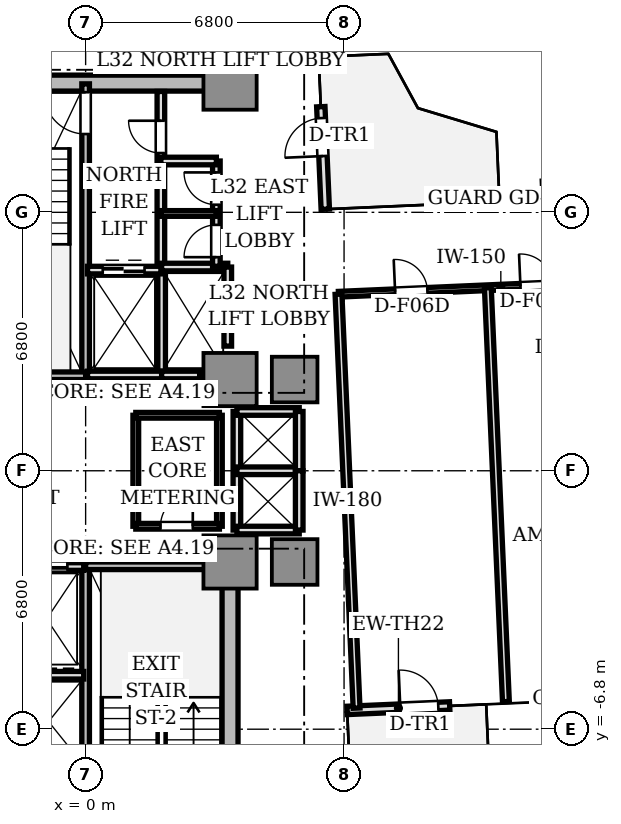
"""IFC4 building model, lengths in metres.
Left out: names, types, materials, properties, quantities, classifications, styles, units other than length and angle.
Written with IfcOpenShell. Run it as: python <this file> out.ifc"""

import sys

from ifc_helpers import new_model, si_unit, direction, frame, frame_2d, origin, origin_2d, place, context, subcontext, project, spatial, rectangle, extrude, source, transform, mapped, element, fill, save


model = new_model("IFC4")
c1 = context("Model", 3, precision=1e-05, world=origin(), true_north=direction((0.0, 1.0)))
c2 = subcontext(c1, "Body", "Model", "MODEL_VIEW")
j1 = project(units=[si_unit("LENGTHUNIT", "METRE"), si_unit("PLANEANGLEUNIT", "RADIAN")], contexts=[c1])
p1 = place(None, origin())
s1 = spatial("IfcSite", under=j1, at=p1, CompositionType="ELEMENT")
p2 = place(p1, origin())
s2 = spatial("IfcBuilding", under=s1, at=p2, CompositionType="ELEMENT")
p3 = place(p2, frame((0.0, 0.0, 118.15)))
s3 = spatial("IfcBuildingStorey", under=s2, at=p3, CompositionType="ELEMENT", Elevation=118.15)
p4 = place(p3, frame((-3.55, 10.2, 0.0), z_axis=(0.0, 0.0, 1.0), x_axis=(1.0, 0.0, 0.0)))
e1 = element("IfcWall", 1, at=p4, inside=s3, PredefinedType="SHEAR", context=c2, shape_type="SweptSolid", body=[
    extrude(rectangle(XDim=7.1, YDim=0.42, at=frame_2d((3.55, 0.0))), origin(), (0.0, 0.0, 1.0), 3.11),
])
p5 = place(p3, frame((3.8, -9.75, 0.0), z_axis=(0.0, 0.0, 1.0), x_axis=(0.0, 1.0, 0.0)))
e2 = element("IfcWall", 2, at=p5, inside=s3, PredefinedType="SHEAR", context=c2, shape_type="SweptSolid", body=[
    extrude(rectangle(XDim=6.9, YDim=0.42, at=frame_2d((3.45, 0.0))), origin(), (0.0, 0.0, 1.0), 3.11),
])
m1 = source(origin(), c2, "Body", "SweptSolid", [
    extrude(rectangle(XDim=1.4, YDim=1.4, at=origin_2d()), origin(), (0.0, 0.0, 1.0), 3.11),
])
for number, where, z_axis, x_axis in (
    (3, (3.8, 2.4, 0.0), (0.0, 0.0, 1.0), (1.0, 0.0, 0.0)),
    (4, (3.8, 10.2, 0.0), (0.0, 0.0, 1.0), (1.0, 0.0, 0.0)),
    (5, (3.8, -2.4, 0.0), (0.0, 0.0, 1.0), (1.0, 0.0, 0.0)),
):
    element("IfcColumn", number, at=place(p3, frame(where, z_axis=z_axis, x_axis=x_axis)), inside=s3, PredefinedType="COLUMN", context=c2, shape_type="MappedRepresentation", body=[
        mapped(m1, transform((0.0, 0.0, 0.0), scale=1.0)),
    ])
m2 = source(origin(), c2, "Body", "SweptSolid", [
    extrude(rectangle(XDim=1.2, YDim=1.2, at=origin_2d()), origin(), (0.0, 0.0, 1.0), 3.11),
])
for number, where, z_axis, x_axis in (
    (6, (5.5, 2.4, 0.0), (0.0, 0.0, 1.0), (1.0, 0.0, 0.0)),
    (7, (5.5, -2.4, 0.0), (0.0, 0.0, 1.0), (1.0, 0.0, 0.0)),
):
    element("IfcColumn", number, at=place(p3, frame(where, z_axis=z_axis, x_axis=x_axis)), inside=s3, PredefinedType="COLUMN", context=c2, shape_type="MappedRepresentation", body=[
        mapped(m2, transform((0.0, 0.0, 0.0), scale=1.0)),
    ])
p6 = place(p3, frame((6.882, -6.306, 0.0), z_axis=(0.0, 0.0, 1.0), x_axis=(0.999045894436, 0.043672655174, 0.0)))
e8 = element("IfcWall", 8, at=p6, inside=s3, PredefinedType="STANDARD", context=c2, shape_type="SweptSolid", body=[
    extrude(rectangle(XDim=2.7, YDim=0.22, at=frame_2d((1.35, 0.0))), origin(), (0.0, 0.0, 1.0), 3.11),
])
p7 = place(p6, frame((1.4, 0.0, 0.0)))
e9 = element("IfcOpeningElement", 9, at=p7, cuts=e8, PredefinedType="OPENING", context=c2, shape_type="SweptSolid", body=[
    extrude(rectangle(XDim=1.0, YDim=2.2, at=frame_2d((0.5, 1.1))), frame((0.0, 0.12, 0.0), z_axis=(0.0, -1.0, 0.0), x_axis=(1.0, 0.0, 0.0)), (0.0, 0.0, 1.0), 0.24),
])
p8 = place(p3, frame((6.306, 6.882, 0.0), z_axis=(0.0, 0.0, 1.0), x_axis=(-0.043672655174, 0.999045894436, 0.0)))
e10 = element("IfcWall", 10, at=p8, inside=s3, PredefinedType="STANDARD", context=c2, shape_type="SweptSolid", body=[
    extrude(rectangle(XDim=2.7, YDim=0.22, at=frame_2d((1.35, 0.0))), origin(), (0.0, 0.0, 1.0), 3.11),
])
p9 = place(p8, frame((1.4, 0.0, 0.0)))
e11 = element("IfcOpeningElement", 11, at=p9, cuts=e10, PredefinedType="OPENING", context=c2, shape_type="SweptSolid", body=[
    extrude(rectangle(XDim=1.0, YDim=2.2, at=frame_2d((0.5, 1.1))), frame((0.0, 0.12, 0.0), z_axis=(0.0, -1.0, 0.0), x_axis=(1.0, 0.0, 0.0)), (0.0, 0.0, 1.0), 0.24),
])
p10 = place(p3, frame((0.0, 2.5, 0.0), z_axis=(0.0, 0.0, 1.0), x_axis=(0.0, 1.0, 0.0)))
e12 = element("IfcWall", 12, at=p10, inside=s3, PredefinedType="SOLIDWALL", context=c2, shape_type="SweptSolid", body=[
    extrude(rectangle(XDim=7.68, YDim=0.2, at=frame_2d((3.84, 0.0))), origin(), (0.0, 0.0, 1.0), 3.11),
])
p11 = place(p10, frame((6.36, 0.0, 0.0)))
e13 = element("IfcOpeningElement", 13, at=p11, cuts=e12, PredefinedType="OPENING", context=c2, shape_type="SweptSolid", body=[
    extrude(rectangle(XDim=1.1, YDim=2.15, at=frame_2d((0.55, 1.075))), frame((0.0, 0.11, 0.0), z_axis=(0.0, -1.0, 0.0), x_axis=(1.0, 0.0, 0.0)), (0.0, 0.0, 1.0), 0.22),
])
p12 = place(p3, frame((-3.72, 2.5, 0.0), z_axis=(0.0, 0.0, 1.0), x_axis=(1.0, 0.0, 0.0)))
e14 = element("IfcWall", 14, at=p12, inside=s3, PredefinedType="SOLIDWALL", context=c2, shape_type="SweptSolid", body=[
    extrude(rectangle(XDim=3.72, YDim=0.2, at=frame_2d((1.86, 0.0))), origin(), (0.0, 0.0, 1.0), 3.11),
])
p13 = place(p3, frame((0.0, -10.18, 0.0), z_axis=(0.0, 0.0, 1.0), x_axis=(0.0, 1.0, 0.0)))
e15 = element("IfcWall", 15, at=p13, inside=s3, PredefinedType="SOLIDWALL", context=c2, shape_type="SweptSolid", body=[
    extrude(rectangle(XDim=7.68, YDim=0.2, at=frame_2d((3.84, 0.0))), origin(), (0.0, 0.0, 1.0), 3.11),
])
p14 = place(p13, frame((0.28, 0.0, 0.0)))
e16 = element("IfcOpeningElement", 16, at=p14, cuts=e15, PredefinedType="OPENING", context=c2, shape_type="SweptSolid", body=[
    extrude(rectangle(XDim=1.1, YDim=2.15, at=frame_2d((0.55, 1.075))), frame((0.0, 0.11, 0.0), z_axis=(0.0, -1.0, 0.0), x_axis=(1.0, 0.0, 0.0)), (0.0, 0.0, 1.0), 0.22),
])
p15 = place(p3, frame((0.0, -2.5, 0.0), z_axis=(0.0, 0.0, 1.0), x_axis=(1.0, 0.0, 0.0)))
e17 = element("IfcWall", 17, at=p15, inside=s3, PredefinedType="SOLIDWALL", context=c2, shape_type="SweptSolid", body=[
    extrude(rectangle(XDim=3.72, YDim=0.2, at=frame_2d((1.86, 0.0))), origin(), (0.0, 0.0, 1.0), 3.11),
])
p16 = place(p3, frame((1.98, 5.32, 0.0), z_axis=(0.0, 0.0, 1.0), x_axis=(0.0, 1.0, 0.0)))
e18 = element("IfcWall", 18, at=p16, inside=s3, PredefinedType="SOLIDWALL", context=c2, shape_type="SweptSolid", body=[
    extrude(rectangle(XDim=4.66, YDim=0.2, at=frame_2d((2.33, 0.0))), origin(), (0.0, 0.0, 1.0), 2.66),
])
p17 = place(p16, frame((3.04, 0.0, 0.0)))
e19 = element("IfcOpeningElement", 19, at=p17, cuts=e18, PredefinedType="OPENING", context=c2, shape_type="SweptSolid", body=[
    extrude(rectangle(XDim=0.85, YDim=2.1, at=frame_2d((0.425, 1.05))), frame((0.0, 0.11, 0.0), z_axis=(0.0, -1.0, 0.0), x_axis=(1.0, 0.0, 0.0)), (0.0, 0.0, 1.0), 0.22),
])
p18 = place(p3, frame((2.0, 2.5, 0.0), z_axis=(0.0, 0.0, 1.0), x_axis=(0.0, 1.0, 0.0)))
e20 = element("IfcWall", 20, at=p18, inside=s3, PredefinedType="SOLIDWALL", context=c2, shape_type="SweptSolid", body=[
    extrude(rectangle(XDim=2.78, YDim=0.2, at=frame_2d((1.39, 0.0))), origin(), (0.0, 0.0, 1.0), 2.66),
])
p19 = place(p3, frame((0.05, 2.52, 0.0), z_axis=(0.0, 0.0, 1.0), x_axis=(1.0, 0.0, 0.0)))
e21 = element("IfcWall", 21, at=p19, inside=s3, PredefinedType="SOLIDWALL", context=c2, shape_type="SweptSolid", body=[
    extrude(rectangle(XDim=1.95, YDim=0.2, at=frame_2d((0.975, 0.0))), origin(), (0.0, 0.0, 1.0), 2.66),
])
p20 = place(p3, frame((0.05, 5.28, 0.0), z_axis=(0.0, 0.0, 1.0), x_axis=(1.0, 0.0, 0.0)))
e22 = element("IfcWall", 22, at=p20, inside=s3, PredefinedType="SOLIDWALL", context=c2, shape_type="SweptSolid", body=[
    extrude(rectangle(XDim=1.93, YDim=0.2, at=frame_2d((0.965, 0.0))), origin(), (0.0, 0.0, 1.0), 2.66),
])
p21 = place(p20, frame((0.4, 0.0, 0.0)))
e23 = element("IfcOpeningElement", 23, at=p21, cuts=e22, PredefinedType="OPENING", context=c2, shape_type="SweptSolid", body=[
    extrude(rectangle(XDim=1.1, YDim=2.2, at=frame_2d((0.55, 1.1))), frame((0.0, 0.11, 0.0), z_axis=(0.0, -1.0, 0.0), x_axis=(1.0, 0.0, 0.0)), (0.0, 0.0, 1.0), 0.22),
])
p22 = place(p3, frame((-2.0, -2.52, 0.0), z_axis=(0.0, 0.0, 1.0), x_axis=(1.0, 0.0, 0.0)))
e24 = element("IfcWall", 24, at=p22, inside=s3, PredefinedType="SOLIDWALL", context=c2, shape_type="SweptSolid", body=[
    extrude(rectangle(XDim=1.95, YDim=0.2, at=frame_2d((0.975, 0.0))), origin(), (0.0, 0.0, 1.0), 2.66),
])
p23 = place(p22, frame((0.42, 0.0, 0.0)))
e25 = element("IfcOpeningElement", 25, at=p23, cuts=e24, PredefinedType="OPENING", context=c2, shape_type="SweptSolid", body=[
    extrude(rectangle(XDim=1.1, YDim=2.2, at=frame_2d((0.55, 1.1))), frame((0.0, 0.11, 0.0), z_axis=(0.0, -1.0, 0.0), x_axis=(1.0, 0.0, 0.0)), (0.0, 0.0, 1.0), 0.22),
])
p24 = place(p3, frame((2.0, 2.52, 0.0), z_axis=(0.0, 0.0, 1.0), x_axis=(1.0, 0.0, 0.0)))
e26 = element("IfcWall", 26, at=p24, inside=s3, PredefinedType="SOLIDWALL", context=c2, shape_type="SweptSolid", body=[
    extrude(rectangle(XDim=1.0, YDim=0.2, at=frame_2d((0.5, 0.0))), origin(), (0.0, 0.0, 1.0), 2.66),
])
p25 = place(p3, frame((2.0, 5.36, 0.0), z_axis=(0.0, 0.0, 1.0), x_axis=(1.0, 0.0, 0.0)))
e27 = element("IfcWall", 27, at=p25, inside=s3, PredefinedType="SOLIDWALL", context=c2, shape_type="SweptSolid", body=[
    extrude(rectangle(XDim=1.74, YDim=0.2, at=frame_2d((0.87, 0.0))), origin(), (0.0, 0.0, 1.0), 2.66),
])
p26 = place(p3, frame((3.74, 3.28, 0.0), z_axis=(0.0, 0.0, 1.0), x_axis=(0.0, 1.0, 0.0)))
e28 = element("IfcWall", 28, at=p26, inside=s3, PredefinedType="SOLIDWALL", context=c2, shape_type="SweptSolid", body=[
    extrude(rectangle(XDim=2.08, YDim=0.2, at=frame_2d((1.04, 0.0))), origin(), (0.0, 0.0, 1.0), 2.66),
])
p27 = place(p26, frame((0.44, 0.0, 0.0)))
e29 = element("IfcOpeningElement", 29, at=p27, cuts=e28, PredefinedType="OPENING", context=c2, shape_type="SweptSolid", body=[
    extrude(rectangle(XDim=1.2, YDim=2.2, at=frame_2d((0.6, 1.1))), frame((0.0, 0.11, 0.0), z_axis=(0.0, -1.0, 0.0), x_axis=(1.0, 0.0, 0.0)), (0.0, 0.0, 1.0), 0.22),
])
p28 = place(p3, frame((-3.74, -5.38, 0.0), z_axis=(0.0, 0.0, 1.0), x_axis=(1.0, 0.0, 0.0)))
e30 = element("IfcWall", 30, at=p28, inside=s3, PredefinedType="SOLIDWALL", context=c2, shape_type="SweptSolid", body=[
    extrude(rectangle(XDim=3.69, YDim=0.2, at=frame_2d((1.845, 0.0))), origin(), (0.0, 0.0, 1.0), 2.66),
])
p29 = place(p3, frame((3.98, -1.56, 0.0), z_axis=(0.0, 0.0, 1.0), x_axis=(0.0, 1.0, 0.0)))
e31 = element("IfcWall", 31, at=p29, inside=s3, PredefinedType="SOLIDWALL", context=c2, shape_type="SweptSolid", body=[
    extrude(rectangle(XDim=3.12, YDim=0.2, at=frame_2d((1.56, 0.0))), origin(), (0.0, 0.0, 1.0), 2.28),
])
for number, where, z_axis, x_axis in (
    (32, (3.98, 1.56, 0.0), (0.0, 0.0, 1.0), (1.0, 0.0, 0.0)),
    (33, (3.98, -1.56, 0.0), (0.0, 0.0, 1.0), (1.0, 0.0, 0.0)),
    (34, (3.98, 0.0, 0.0), (0.0, 0.0, 1.0), (1.0, 0.0, 0.0)),
):
    element("IfcWall", number, at=place(p3, frame(where, z_axis=z_axis, x_axis=x_axis)), inside=s3, PredefinedType="SOLIDWALL", context=c2, shape_type="SweptSolid", body=[
        extrude(rectangle(XDim=1.64, YDim=0.2, at=frame_2d((0.82, 0.0))), origin(), (0.0, 0.0, 1.0), 2.66),
    ])
for number, where, z_axis, x_axis in (
    (35, (5.62, 0.0, 0.0), (0.0, 0.0, 1.0), (0.0, 1.0, 0.0)),
    (36, (5.62, -1.56, 0.0), (0.0, 0.0, 1.0), (0.0, 1.0, 0.0)),
):
    element("IfcWall", number, at=place(p3, frame(where, z_axis=z_axis, x_axis=x_axis)), inside=s3, PredefinedType="SOLIDWALL", context=c2, shape_type="SweptSolid", body=[
        extrude(rectangle(XDim=1.56, YDim=0.2, at=frame_2d((0.78, 0.0))), origin(), (0.0, 0.0, 1.0), 2.66),
    ])
p30 = place(p3, frame((3.44, 5.38, 0.0), z_axis=(0.0, 0.0, 1.0), x_axis=(0.0, 1.0, 0.0)))
e37 = element("IfcWall", 37, at=p30, inside=s3, PredefinedType="SOLIDWALL", context=c2, shape_type="SweptSolid", body=[
    extrude(rectangle(XDim=2.77, YDim=0.2, at=frame_2d((1.385, 0.0))), origin(), (0.0, 0.0, 1.0), 2.66),
])
p31 = place(p30, frame((0.24, 0.0, 0.0)))
e38 = element("IfcOpeningElement", 38, at=p31, cuts=e37, PredefinedType="OPENING", context=c2, shape_type="SweptSolid", body=[
    extrude(rectangle(XDim=0.85, YDim=2.1, at=frame_2d((0.425, 1.05))), frame((0.0, 0.11, 0.0), z_axis=(0.0, -1.0, 0.0), x_axis=(1.0, 0.0, 0.0)), (0.0, 0.0, 1.0), 0.22),
])
p32 = place(p30, frame((1.62, 0.0, 0.0)))
e39 = element("IfcOpeningElement", 39, at=p32, cuts=e37, PredefinedType="OPENING", context=c2, shape_type="SweptSolid", body=[
    extrude(rectangle(XDim=0.85, YDim=2.1, at=frame_2d((0.425, 1.05))), frame((0.0, 0.11, 0.0), z_axis=(0.0, -1.0, 0.0), x_axis=(1.0, 0.0, 0.0)), (0.0, 0.0, 1.0), 0.22),
])
p33 = place(p3, frame((1.98, 8.15, 0.0), z_axis=(0.0, 0.0, 1.0), x_axis=(1.0, 0.0, 0.0)))
e40 = element("IfcWall", 40, at=p33, inside=s3, PredefinedType="SOLIDWALL", context=c2, shape_type="SweptSolid", body=[
    extrude(rectangle(XDim=1.46, YDim=0.2, at=frame_2d((0.73, 0.0))), origin(), (0.0, 0.0, 1.0), 2.66),
])
p34 = place(p3, frame((1.98, 6.77, 0.0), z_axis=(0.0, 0.0, 1.0), x_axis=(1.0, 0.0, 0.0)))
e41 = element("IfcWall", 41, at=p34, inside=s3, PredefinedType="PARTITIONING", context=c2, shape_type="SweptSolid", body=[
    extrude(rectangle(XDim=1.46, YDim=0.15, at=frame_2d((0.73, 0.0))), origin(), (0.0, 0.0, 1.0), 2.66),
])
p35 = place(p3, frame((1.32, -1.46, 0.0), z_axis=(0.0, 0.0, 1.0), x_axis=(0.0, 1.0, 0.0)))
e42 = element("IfcWall", 42, at=p35, inside=s3, PredefinedType="PARTITIONING", context=c2, shape_type="SweptSolid", body=[
    extrude(rectangle(XDim=2.92, YDim=0.15, at=frame_2d((1.46, 0.0))), origin(), (0.0, 0.0, 1.0), 2.66),
])
p36 = place(p3, frame((3.52, -1.46, 0.0), z_axis=(0.0, 0.0, 1.0), x_axis=(0.0, 1.0, 0.0)))
e43 = element("IfcWall", 43, at=p36, inside=s3, PredefinedType="PARTITIONING", context=c2, shape_type="SweptSolid", body=[
    extrude(rectangle(XDim=2.92, YDim=0.15, at=frame_2d((1.46, 0.0))), origin(), (0.0, 0.0, 1.0), 2.28),
])
p37 = place(p3, frame((1.32, 1.46, 0.0), z_axis=(0.0, 0.0, 1.0), x_axis=(1.0, 0.0, 0.0)))
e44 = element("IfcWall", 44, at=p37, inside=s3, PredefinedType="PARTITIONING", context=c2, shape_type="SweptSolid", body=[
    extrude(rectangle(XDim=2.2, YDim=0.15, at=frame_2d((1.1, 0.0))), origin(), (0.0, 0.0, 1.0), 2.66),
])
p38 = place(p3, frame((1.32, -1.46, 0.0), z_axis=(0.0, 0.0, 1.0), x_axis=(1.0, 0.0, 0.0)))
e45 = element("IfcWall", 45, at=p38, inside=s3, PredefinedType="PARTITIONING", context=c2, shape_type="SweptSolid", body=[
    extrude(rectangle(XDim=2.2, YDim=0.15, at=frame_2d((1.1, 0.0))), origin(), (0.0, 0.0, 1.0), 2.66),
])
p39 = place(p38, frame((0.65, 0.0, 0.0)))
e46 = element("IfcOpeningElement", 46, at=p39, cuts=e45, PredefinedType="OPENING", context=c2, shape_type="SweptSolid", body=[
    extrude(rectangle(XDim=0.85, YDim=2.1, at=frame_2d((0.425, 1.05))), frame((0.0, 0.085, 0.0), z_axis=(0.0, -1.0, 0.0), x_axis=(1.0, 0.0, 0.0)), (0.0, 0.0, 1.0), 0.17),
])
p40 = place(p3, frame((6.654, 4.645, 0.0), z_axis=(0.0, 0.0, 1.0), x_axis=(0.999048925025, 0.043603272887, 0.0)))
e47 = element("IfcWall", 47, at=p40, inside=s3, PredefinedType="PARTITIONING", context=c2, shape_type="SweptSolid", body=[
    extrude(rectangle(XDim=8.55, YDim=0.15, at=frame_2d((4.275, 0.0))), origin(), (0.0, 0.0, 1.0), 2.63),
])
p41 = place(p40, frame((1.491, 0.0, 0.0)))
e48 = element("IfcOpeningElement", 48, at=p41, cuts=e47, PredefinedType="OPENING", context=c2, shape_type="SweptSolid", body=[
    extrude(rectangle(XDim=0.85, YDim=2.1, at=frame_2d((0.425, 1.05))), frame((0.0, 0.085, 0.0), z_axis=(0.0, -1.0, 0.0), x_axis=(1.0, 0.0, 0.0)), (0.0, 0.0, 1.0), 0.17),
])
p42 = place(p40, frame((4.792, 0.0, 0.0)))
e49 = element("IfcOpeningElement", 49, at=p42, cuts=e47, PredefinedType="OPENING", context=c2, shape_type="SweptSolid", body=[
    extrude(rectangle(XDim=0.85, YDim=2.1, at=frame_2d((0.425, 1.05))), frame((0.0, 0.085, 0.0), z_axis=(0.0, -1.0, 0.0), x_axis=(1.0, 0.0, 0.0)), (0.0, 0.0, 1.0), 0.17),
])
p43 = place(p3, frame((7.129, -6.245, 0.0), z_axis=(0.0, 0.0, 1.0), x_axis=(-0.043608291235, 0.999048705988, 0.0)))
e50 = element("IfcWall", 50, at=p43, inside=s3, PredefinedType="PARTITIONING", context=c2, shape_type="SweptSolid", body=[
    extrude(rectangle(XDim=10.9, YDim=0.18, at=frame_2d((5.45, 0.0))), origin(), (0.0, 0.0, 1.0), 2.66),
])
p44 = place(p3, frame((10.583, 4.816, 0.0), z_axis=(0.0, 0.0, 1.0), x_axis=(0.043609267053, -0.999048663393, 0.0)))
e51 = element("IfcWall", 51, at=p44, inside=s3, PredefinedType="PARTITIONING", context=c2, shape_type="SweptSolid", body=[
    extrude(rectangle(XDim=10.9, YDim=0.18, at=frame_2d((5.45, 0.0))), origin(), (0.0, 0.0, 1.0), 2.66),
])
m3 = source(origin(), c2, "Body", "SweptSolid", [
    extrude(rectangle(XDim=1.0, YDim=0.05, at=origin_2d()), origin(), (0.0, 0.0, 1.0), 2.2),
])
p45 = place(p7, frame((0.5, 0.0, 0.0)))
e52 = element("IfcDoor", 52, at=p45, inside=s3, OperationType="SINGLE_SWING_LEFT", PredefinedType="DOOR", context=c2, shape_type="MappedRepresentation", body=[
    mapped(m3, transform((0.0, 0.0, 0.0), scale=1.0)),
])
fill(e9, e52)
p46 = place(p9, frame((0.5, 0.0, 0.0)))
e53 = element("IfcDoor", 53, at=p46, inside=s3, OperationType="SINGLE_SWING_LEFT", PredefinedType="DOOR", context=c2, shape_type="MappedRepresentation", body=[
    mapped(m3, transform((0.0, 0.0, 0.0), scale=1.0)),
])
fill(e11, e53)
m4 = source(origin(), c2, "Body", "SweptSolid", [
    extrude(rectangle(XDim=1.1, YDim=0.05, at=origin_2d()), origin(), (0.0, 0.0, 1.0), 2.15),
])
p47 = place(p11, frame((0.55, 0.0, 0.0)))
e54 = element("IfcDoor", 54, at=p47, inside=s3, OperationType="SINGLE_SWING_RIGHT", PredefinedType="DOOR", context=c2, shape_type="MappedRepresentation", body=[
    mapped(m4, transform((0.0, 0.0, 0.0), scale=1.0)),
])
fill(e13, e54)
m5 = source(origin(), c2, "Body", "SweptSolid", [
    extrude(rectangle(XDim=0.85, YDim=0.05, at=origin_2d()), origin(), (0.0, 0.0, 1.0), 2.1),
])
p48 = place(p17, frame((0.425, 0.0, 0.0)))
e55 = element("IfcDoor", 55, at=p48, inside=s3, OperationType="SINGLE_SWING_RIGHT", PredefinedType="DOOR", context=c2, shape_type="MappedRepresentation", body=[
    mapped(m5, transform((0.0, 0.0, 0.0), scale=1.0)),
])
fill(e19, e55)
m6 = source(origin(), c2, "Body", "SweptSolid", [
    extrude(rectangle(XDim=1.1, YDim=0.05, at=origin_2d()), origin(), (0.0, 0.0, 1.0), 2.2),
])
p49 = place(p21, frame((0.55, 0.0, 0.0)))
e56 = element("IfcDoor", 56, at=p49, inside=s3, OperationType="DOUBLE_DOOR_SLIDING", PredefinedType="DOOR", context=c2, shape_type="MappedRepresentation", body=[
    mapped(m6, transform((0.0, 0.0, 0.0), scale=1.0)),
])
fill(e23, e56)
p50 = place(p23, frame((0.55, 0.0, 0.0)))
e57 = element("IfcDoor", 57, at=p50, inside=s3, OperationType="DOUBLE_DOOR_SLIDING", PredefinedType="DOOR", context=c2, shape_type="MappedRepresentation", body=[
    mapped(m6, transform((0.0, 0.0, 0.0), scale=1.0)),
])
fill(e25, e57)
m7 = source(origin(), c2, "Body", "SweptSolid", [
    extrude(rectangle(XDim=1.2, YDim=0.05, at=origin_2d()), origin(), (0.0, 0.0, 1.0), 2.2),
])
p51 = place(p27, frame((0.6, 0.0, 0.0)))
e58 = element("IfcDoor", 58, at=p51, inside=s3, OperationType="DOUBLE_DOOR_SLIDING", PredefinedType="DOOR", context=c2, shape_type="MappedRepresentation", body=[
    mapped(m7, transform((0.0, 0.0, 0.0), scale=1.0)),
])
fill(e29, e58)
p52 = place(p31, frame((0.425, 0.0, 0.0)))
e59 = element("IfcDoor", 59, at=p52, inside=s3, OperationType="SINGLE_SWING_LEFT", PredefinedType="DOOR", context=c2, shape_type="MappedRepresentation", body=[
    mapped(m5, transform((0.0, 0.0, 0.0), scale=1.0)),
])
fill(e38, e59)
p53 = place(p32, frame((0.425, 0.0, 0.0)))
e60 = element("IfcDoor", 60, at=p53, inside=s3, OperationType="SINGLE_SWING_RIGHT", PredefinedType="DOOR", context=c2, shape_type="MappedRepresentation", body=[
    mapped(m5, transform((0.0, 0.0, 0.0), scale=1.0)),
])
fill(e39, e60)
p54 = place(p39, frame((0.425, 0.0, 0.0)))
e61 = element("IfcDoor", 61, at=p54, inside=s3, OperationType="SINGLE_SWING_RIGHT", PredefinedType="DOOR", context=c2, shape_type="MappedRepresentation", body=[
    mapped(m5, transform((0.0, 0.0, 0.0), scale=1.0)),
])
fill(e46, e61)
p55 = place(p41, frame((0.425, 0.0, 0.0)))
e62 = element("IfcDoor", 62, at=p55, inside=s3, OperationType="SINGLE_SWING_LEFT", PredefinedType="DOOR", context=c2, shape_type="MappedRepresentation", body=[
    mapped(m5, transform((0.0, 0.0, 0.0), scale=1.0)),
])
fill(e48, e62)
p56 = place(p42, frame((0.425, 0.0, 0.0)))
e63 = element("IfcDoor", 63, at=p56, inside=s3, OperationType="SINGLE_SWING_LEFT", PredefinedType="DOOR", context=c2, shape_type="MappedRepresentation", body=[
    mapped(m5, transform((0.0, 0.0, 0.0), scale=1.0)),
])
fill(e49, e63)
save(model, sys.argv[1])
